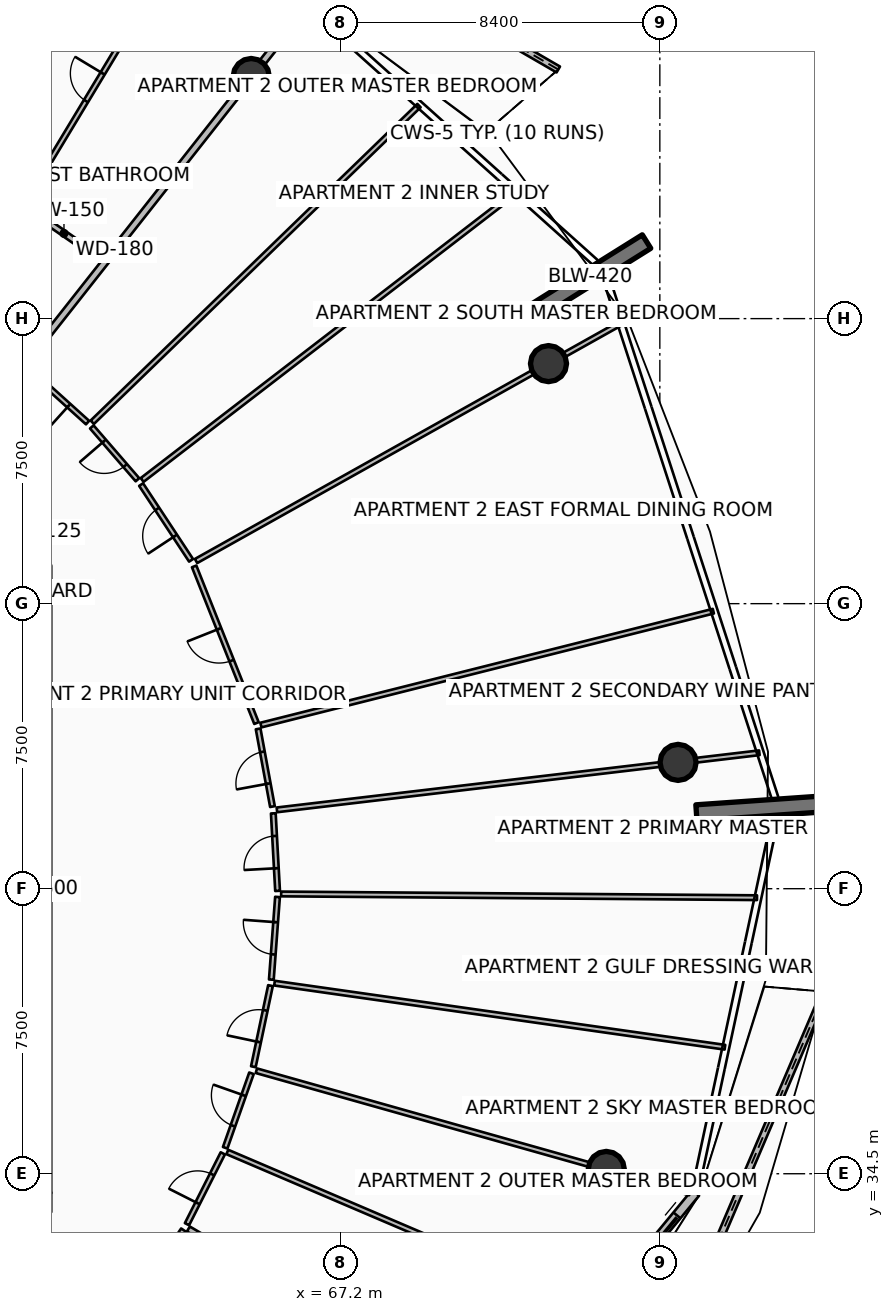
"""IFC4 building model, lengths in metres.
Left out: names, types, materials, properties, quantities, classifications, styles, units other than length and angle.
Written with IfcOpenShell. Run it as: python <this file> out.ifc"""

import sys

from ifc_helpers import new_model, si_unit, direction, frame, frame_2d, origin, origin_2d, place, context, subcontext, project, spatial, polyline, rectangle, circle, outline, extrude, element, fill, save


model = new_model("IFC4")
c1 = context("Model", 3, precision=1e-05, world=origin(), true_north=direction((0.0, 1.0)))
c2 = subcontext(c1, "Body", "Model", "MODEL_VIEW")
j1 = project(units=[si_unit("LENGTHUNIT", "METRE"), si_unit("PLANEANGLEUNIT", "RADIAN")], contexts=[c1])
p1 = place(None, origin())
s1 = spatial("IfcSite", under=j1, at=p1, CompositionType="ELEMENT")
p2 = place(p1, origin())
s2 = spatial("IfcBuilding", under=s1, at=p2, CompositionType="ELEMENT")
p3 = place(p2, frame((0.0, 0.0, 290.6)))
s3 = spatial("IfcBuildingStorey", under=s2, at=p3, CompositionType="ELEMENT", Elevation=290.6)
p4 = place(p3, frame((72.281, 57.173, 0.0), z_axis=(0.0, 0.0, 1.0), x_axis=(0.848033572426, 0.529942506352, 0.0)))
e1 = element("IfcWall", 1, at=p4, inside=s3, PredefinedType="SOLIDWALL", context=c2, shape_type="SweptSolid", body=[
    extrude(rectangle(XDim=3.5, YDim=0.42, at=frame_2d((1.75, 0.0))), origin(), (0.0, 0.0, 1.0), 3.85),
])
p5 = place(p3, frame((76.562, 43.997, 0.0), z_axis=(0.0, 0.0, 1.0), x_axis=(0.997563824095, 0.069759707979, 0.0)))
e2 = element("IfcWall", 2, at=p5, inside=s3, PredefinedType="SOLIDWALL", context=c2, shape_type="SweptSolid", body=[
    extrude(rectangle(XDim=3.5, YDim=0.42, at=frame_2d((1.75, 0.0))), origin(), (0.0, 0.0, 1.0), 3.85),
])
for number, where, z_axis, x_axis in (
    (3, (72.67, 55.816, 0.0), (0.0, 0.0, 1.0), (1.0, 0.0, 0.0)),
    (4, (64.847, 63.371, 0.0), (0.0, 0.0, 1.0), (1.0, 0.0, 0.0)),
    (5, (74.191, 34.613, 0.0), (0.0, 0.0, 1.0), (1.0, 0.0, 0.0)),
    (6, (76.08, 45.323, 0.0), (0.0, 0.0, 1.0), (1.0, 0.0, 0.0)),
):
    element("IfcColumn", number, at=place(p3, frame(where, z_axis=z_axis, x_axis=x_axis)), inside=s3, PredefinedType="COLUMN", context=c2, shape_type="SweptSolid", body=[
        extrude(circle(Radius=0.475, at=origin_2d()), origin(), (0.0, 0.0, 1.0), 3.59),
    ])
p6 = place(p3, frame((72.927, 63.555, 0.0), z_axis=(0.0, 0.0, 1.0), x_axis=(-0.865262565506, 0.501318953097, 0.0)))
e7 = element("IfcWall", 7, at=p6, inside=s3, PredefinedType="PARAPET", context=c2, shape_type="SweptSolid", body=[
    extrude(outline(polyline([(0.0, 0.0), (12.323, 0.0), (12.323, 1.832), (6.162, 1.853), (0.0, 1.756), (0.0, 0.0)])), frame((0.0, 0.09, 0.0), z_axis=(0.0, -1.0, 0.0), x_axis=(1.0, 0.0, 0.0)), (0.0, 0.0, 1.0), 0.18),
])
p7 = place(p3, frame((75.235, 28.258, 0.0), z_axis=(0.0, 0.0, 1.0), x_axis=(0.392715313702, 0.919660090677, 0.0)))
e8 = element("IfcWall", 8, at=p7, inside=s3, PredefinedType="PARAPET", context=c2, shape_type="SweptSolid", body=[
    extrude(outline(polyline([(0.0, 0.0), (11.995, 0.0), (11.995, 1.12), (5.998, 1.182), (0.0, 1.348), (0.0, 0.0)])), frame((0.0, 0.09, 0.0), z_axis=(0.0, -1.0, 0.0), x_axis=(1.0, 0.0, 0.0)), (0.0, 0.0, 1.0), 0.18),
])
p8 = place(p3, frame((69.258, 25.178, 0.0), z_axis=(0.0, 0.0, 1.0), x_axis=(0.636680093065, 0.771128043255, 0.0)))
e9 = element("IfcWall", 9, at=p8, inside=s3, PredefinedType="SOLIDWALL", context=c2, shape_type="SweptSolid", body=[
    extrude(rectangle(XDim=11.438, YDim=0.24, at=frame_2d((5.719, 0.0))), origin(), (0.0, 0.0, 1.0), 2.54),
])
p9 = place(p8, frame((9.218, 0.0, 0.0)))
e10 = element("IfcOpeningElement", 10, at=p9, cuts=e9, PredefinedType="OPENING", context=c2, shape_type="SweptSolid", body=[
    extrude(rectangle(XDim=1.45, YDim=2.15, at=frame_2d((0.725, 1.075))), frame((0.0, 0.13, 0.0), z_axis=(0.0, -1.0, 0.0), x_axis=(1.0, 0.0, 0.0)), (0.0, 0.0, 1.0), 0.26),
])
p10 = place(p8, frame((0.28, 0.0, 0.65)))
e11 = element("IfcOpeningElement", 11, at=p10, cuts=e9, PredefinedType="OPENING", context=c2, shape_type="SweptSolid", body=[
    extrude(rectangle(XDim=1.6, YDim=1.5, at=frame_2d((0.8, 0.75))), frame((0.0, 0.13, 0.0), z_axis=(0.0, -1.0, 0.0), x_axis=(1.0, 0.0, 0.0)), (0.0, 0.0, 1.0), 0.26),
])
p11 = place(p3, frame((56.188, 52.386, 0.0), z_axis=(0.0, 0.0, 1.0), x_axis=(0.619097230176, 0.785314344443, 0.0)))
e12 = element("IfcWall", 12, at=p11, inside=s3, PredefinedType="PARTITIONING", context=c2, shape_type="SweptSolid", body=[
    extrude(rectangle(XDim=16.37, YDim=0.18, at=frame_2d((8.185, 0.0))), origin(), (0.0, 0.0, 1.0), 2.957),
])
p12 = place(p3, frame((60.92, 58.55, 0.0), z_axis=(0.0, 0.0, 1.0), x_axis=(-0.822394599949, 0.568917500148, 0.0)))
e13 = element("IfcWall", 13, at=p12, inside=s3, PredefinedType="PARTITIONING", context=c2, shape_type="SweptSolid", body=[
    extrude(rectangle(XDim=2.431, YDim=0.15, at=frame_2d((1.216, 0.0))), origin(), (0.0, 0.0, 1.0), 2.957),
])
p13 = place(p3, frame((58.893, 60.061, 0.0), z_axis=(0.0, 0.0, 1.0), x_axis=(0.516439316059, 0.856323789713, 0.0)))
e14 = element("IfcWall", 14, at=p13, inside=s3, PredefinedType="PARTITIONING", context=c2, shape_type="SweptSolid", body=[
    extrude(rectangle(XDim=7.07, YDim=0.125, at=frame_2d((3.535, 0.0))), origin(), (0.0, 0.0, 1.0), 3.03),
])
p14 = place(p13, frame((3.11, 0.0, 0.0)))
e15 = element("IfcOpeningElement", 15, at=p14, cuts=e14, PredefinedType="OPENING", context=c2, shape_type="SweptSolid", body=[
    extrude(rectangle(XDim=0.85, YDim=2.06, at=frame_2d((0.425, 1.03))), frame((0.0, 0.073, 0.0), z_axis=(0.0, -1.0, 0.0), x_axis=(1.0, 0.0, 0.0)), (0.0, 0.0, 1.0), 0.145),
])
p15 = place(p3, frame((61.836, 31.22, 0.0), z_axis=(0.0, 0.0, 1.0), x_axis=(0.564720073442, 0.825282520505, 0.0)))
e16 = element("IfcWall", 16, at=p15, inside=s3, PredefinedType="PARTITIONING", context=c2, shape_type="SweptSolid", body=[
    extrude(rectangle(XDim=2.178, YDim=0.15, at=frame_2d((1.089, 0.0))), origin(), (0.0, 0.0, 1.0), 2.957),
])
p16 = place(p15, frame((0.664, 0.0, 0.0)))
e17 = element("IfcOpeningElement", 17, at=p16, cuts=e16, PredefinedType="OPENING", context=c2, shape_type="SweptSolid", body=[
    extrude(rectangle(XDim=0.85, YDim=2.06, at=frame_2d((0.425, 1.03))), frame((0.0, 0.085, 0.0), z_axis=(0.0, -1.0, 0.0), x_axis=(1.0, 0.0, 0.0)), (0.0, 0.0, 1.0), 0.17),
])
p17 = place(p3, frame((63.194, 33.046, 0.0), z_axis=(0.0, 0.0, 1.0), x_axis=(0.8615329034, -0.507701739566, 0.0)))
e18 = element("IfcWall", 18, at=p17, inside=s3, PredefinedType="PARTITIONING", context=c2, shape_type="SweptSolid", body=[
    extrude(rectangle(XDim=4.46, YDim=0.15, at=frame_2d((2.23, 0.0))), origin(), (0.0, 0.0, 1.0), 3.03),
])
p18 = place(p3, frame((64.219, 35.072, 0.0), z_axis=(0.0, 0.0, 1.0), x_axis=(0.91961011962, -0.392832315235, 0.0)))
e19 = element("IfcWall", 19, at=p18, inside=s3, PredefinedType="PARTITIONING", context=c2, shape_type="SweptSolid", body=[
    extrude(rectangle(XDim=10.493, YDim=0.125, at=frame_2d((5.247, 0.0))), origin(), (0.0, 0.0, 1.0), 3.03),
])
p19 = place(p3, frame((63.157, 33.172, 0.0), z_axis=(0.0, 0.0, 1.0), x_axis=(0.451230403471, 0.892407487073, 0.0)))
e20 = element("IfcWall", 20, at=p19, inside=s3, PredefinedType="PARTITIONING", context=c2, shape_type="SweptSolid", body=[
    extrude(rectangle(XDim=2.088, YDim=0.125, at=frame_2d((1.044, 0.0))), origin(), (0.0, 0.0, 1.0), 3.03),
])
p20 = place(p19, frame((0.619, 0.0, 0.0)))
e21 = element("IfcOpeningElement", 21, at=p20, cuts=e20, PredefinedType="OPENING", context=c2, shape_type="SweptSolid", body=[
    extrude(rectangle(XDim=0.85, YDim=2.06, at=frame_2d((0.425, 1.03))), frame((0.0, 0.073, 0.0), z_axis=(0.0, -1.0, 0.0), x_axis=(1.0, 0.0, 0.0)), (0.0, 0.0, 1.0), 0.145),
])
p21 = place(p3, frame((64.162, 35.183, 0.0), z_axis=(0.0, 0.0, 1.0), x_axis=(0.332881557629, 0.942968646664, 0.0)))
e22 = element("IfcWall", 22, at=p21, inside=s3, PredefinedType="PARTITIONING", context=c2, shape_type="SweptSolid", body=[
    extrude(rectangle(XDim=2.079, YDim=0.125, at=frame_2d((1.039, 0.0))), origin(), (0.0, 0.0, 1.0), 2.957),
])
p22 = place(p21, frame((0.614, 0.0, 0.0)))
e23 = element("IfcOpeningElement", 23, at=p22, cuts=e22, PredefinedType="OPENING", context=c2, shape_type="SweptSolid", body=[
    extrude(rectangle(XDim=0.85, YDim=2.06, at=frame_2d((0.425, 1.03))), frame((0.0, 0.073, 0.0), z_axis=(0.0, -1.0, 0.0), x_axis=(1.0, 0.0, 0.0)), (0.0, 0.0, 1.0), 0.145),
])
p23 = place(p3, frame((64.983, 37.21, 0.0), z_axis=(0.0, 0.0, 1.0), x_axis=(0.962453678557, -0.271445973691, 0.0)))
e24 = element("IfcWall", 24, at=p23, inside=s3, PredefinedType="PARTITIONING", context=c2, shape_type="SweptSolid", body=[
    extrude(rectangle(XDim=11.85, YDim=0.125, at=frame_2d((5.925, 0.0))), origin(), (0.0, 0.0, 1.0), 2.957),
])
p24 = place(p3, frame((65.46, 39.515, 0.0), z_axis=(0.0, 0.0, 1.0), x_axis=(0.990024400928, -0.140896009764, 0.0)))
e25 = element("IfcWall", 25, at=p24, inside=s3, PredefinedType="PARTITIONING", context=c2, shape_type="SweptSolid", body=[
    extrude(rectangle(XDim=11.972, YDim=0.125, at=frame_2d((5.986, 0.0))), origin(), (0.0, 0.0, 1.0), 3.03),
])
p25 = place(p3, frame((65.635, 41.862, 0.0), z_axis=(0.0, 0.0, 1.0), x_axis=(0.999969129377, -0.007857499155, 0.0)))
e26 = element("IfcWall", 26, at=p25, inside=s3, PredefinedType="PARTITIONING", context=c2, shape_type="SweptSolid", body=[
    extrude(rectangle(XDim=12.522, YDim=0.125, at=frame_2d((6.261, 0.0))), origin(), (0.0, 0.0, 1.0), 3.03),
])
p26 = place(p3, frame((64.904, 37.316, 0.0), z_axis=(0.0, 0.0, 1.0), x_axis=(0.206653610436, 0.978414168588, 0.0)))
e27 = element("IfcWall", 27, at=p26, inside=s3, PredefinedType="PARTITIONING", context=c2, shape_type="SweptSolid", body=[
    extrude(rectangle(XDim=2.181, YDim=0.125, at=frame_2d((1.09, 0.0))), origin(), (0.0, 0.0, 1.0), 2.957),
])
p27 = place(p26, frame((0.665, 0.0, 0.0)))
e28 = element("IfcOpeningElement", 28, at=p27, cuts=e27, PredefinedType="OPENING", context=c2, shape_type="SweptSolid", body=[
    extrude(rectangle(XDim=0.85, YDim=2.06, at=frame_2d((0.425, 1.03))), frame((0.0, 0.073, 0.0), z_axis=(0.0, -1.0, 0.0), x_axis=(1.0, 0.0, 0.0)), (0.0, 0.0, 1.0), 0.145),
])
p28 = place(p3, frame((65.377, 39.607, 0.0), z_axis=(0.0, 0.0, 1.0), x_axis=(0.074547851994, 0.997217437555, 0.0)))
e29 = element("IfcWall", 29, at=p28, inside=s3, PredefinedType="PARTITIONING", context=c2, shape_type="SweptSolid", body=[
    extrude(rectangle(XDim=2.181, YDim=0.125, at=frame_2d((1.091, 0.0))), origin(), (0.0, 0.0, 1.0), 3.03),
])
p29 = place(p28, frame((0.666, 0.0, 0.0)))
e30 = element("IfcOpeningElement", 30, at=p29, cuts=e29, PredefinedType="OPENING", context=c2, shape_type="SweptSolid", body=[
    extrude(rectangle(XDim=0.85, YDim=2.06, at=frame_2d((0.425, 1.03))), frame((0.0, 0.073, 0.0), z_axis=(0.0, -1.0, 0.0), x_axis=(1.0, 0.0, 0.0)), (0.0, 0.0, 1.0), 0.145),
])
p30 = place(p3, frame((65.541, 41.942, 0.0), z_axis=(0.0, 0.0, 1.0), x_axis=(-0.054960479128, 0.998488530597, 0.0)))
e31 = element("IfcWall", 31, at=p30, inside=s3, PredefinedType="PARTITIONING", context=c2, shape_type="SweptSolid", body=[
    extrude(rectangle(XDim=2.043, YDim=0.125, at=frame_2d((1.022, 0.0))), origin(), (0.0, 0.0, 1.0), 2.957),
])
p31 = place(p30, frame((0.597, 0.0, 0.0)))
e32 = element("IfcOpeningElement", 32, at=p31, cuts=e31, PredefinedType="OPENING", context=c2, shape_type="SweptSolid", body=[
    extrude(rectangle(XDim=0.85, YDim=2.06, at=frame_2d((0.425, 1.03))), frame((0.0, 0.073, 0.0), z_axis=(0.0, -1.0, 0.0), x_axis=(1.0, 0.0, 0.0)), (0.0, 0.0, 1.0), 0.145),
])
p32 = place(p3, frame((65.524, 44.074, 0.0), z_axis=(0.0, 0.0, 1.0), x_axis=(0.993069543008, 0.117528221075, 0.0)))
e33 = element("IfcWall", 33, at=p32, inside=s3, PredefinedType="PARTITIONING", context=c2, shape_type="SweptSolid", body=[
    extrude(rectangle(XDim=12.784, YDim=0.125, at=frame_2d((6.392, 0.0))), origin(), (0.0, 0.0, 1.0), 2.957),
])
p33 = place(p3, frame((65.102, 46.305, 0.0), z_axis=(0.0, 0.0, 1.0), x_axis=(0.969744651586, 0.244121508108, 0.0)))
e34 = element("IfcWall", 34, at=p33, inside=s3, PredefinedType="PARTITIONING", context=c2, shape_type="SweptSolid", body=[
    extrude(rectangle(XDim=12.277, YDim=0.125, at=frame_2d((6.138, 0.0))), origin(), (0.0, 0.0, 1.0), 3.03),
])
p34 = place(p3, frame((65.406, 44.161, 0.0), z_axis=(0.0, 0.0, 1.0), x_axis=(-0.181252122481, 0.983436661965, 0.0)))
e35 = element("IfcWall", 35, at=p34, inside=s3, PredefinedType="PARTITIONING", context=c2, shape_type="SweptSolid", body=[
    extrude(rectangle(XDim=2.078, YDim=0.125, at=frame_2d((1.039, 0.0))), origin(), (0.0, 0.0, 1.0), 2.957),
])
p35 = place(p34, frame((0.614, 0.0, 0.0)))
e36 = element("IfcOpeningElement", 36, at=p35, cuts=e35, PredefinedType="OPENING", context=c2, shape_type="SweptSolid", body=[
    extrude(rectangle(XDim=0.85, YDim=2.06, at=frame_2d((0.425, 1.03))), frame((0.0, 0.073, 0.0), z_axis=(0.0, -1.0, 0.0), x_axis=(1.0, 0.0, 0.0)), (0.0, 0.0, 1.0), 0.145),
])
p36 = place(p3, frame((64.986, 46.358, 0.0), z_axis=(0.0, 0.0, 1.0), x_axis=(-0.369596956752, 0.929192170414, 0.0)))
e37 = element("IfcWall", 37, at=p36, inside=s3, PredefinedType="PARTITIONING", context=c2, shape_type="SweptSolid", body=[
    extrude(rectangle(XDim=4.437, YDim=0.125, at=frame_2d((2.219, 0.0))), origin(), (0.0, 0.0, 1.0), 2.957),
])
p37 = place(p36, frame((1.768, 0.0, 0.0)))
e38 = element("IfcOpeningElement", 38, at=p37, cuts=e37, PredefinedType="OPENING", context=c2, shape_type="SweptSolid", body=[
    extrude(rectangle(XDim=0.9, YDim=2.08, at=frame_2d((0.45, 1.04))), frame((0.0, 0.073, 0.0), z_axis=(0.0, -1.0, 0.0), x_axis=(1.0, 0.0, 0.0)), (0.0, 0.0, 1.0), 0.145),
])
p38 = place(p3, frame((63.396, 50.622, 0.0), z_axis=(0.0, 0.0, 1.0), x_axis=(0.872499176967, 0.4886155812, 0.0)))
e39 = element("IfcWall", 39, at=p38, inside=s3, PredefinedType="PARTITIONING", context=c2, shape_type="SweptSolid", body=[
    extrude(rectangle(XDim=12.784, YDim=0.125, at=frame_2d((6.392, 0.0))), origin(), (0.0, 0.0, 1.0), 2.957),
])
p39 = place(p3, frame((61.978, 52.754, 0.0), z_axis=(0.0, 0.0, 1.0), x_axis=(0.792559605076, 0.609794450944, 0.0)))
e40 = element("IfcWall", 40, at=p39, inside=s3, PredefinedType="PARTITIONING", context=c2, shape_type="SweptSolid", body=[
    extrude(rectangle(XDim=12.406, YDim=0.125, at=frame_2d((6.203, 0.0))), origin(), (0.0, 0.0, 1.0), 3.03),
])
p40 = place(p3, frame((60.665, 54.273, 0.0), z_axis=(0.0, 0.0, 1.0), x_axis=(0.718133524399, 0.695905339205, 0.0)))
e41 = element("IfcWall", 41, at=p40, inside=s3, PredefinedType="PARTITIONING", context=c2, shape_type="SweptSolid", body=[
    extrude(rectangle(XDim=11.972, YDim=0.125, at=frame_2d((5.986, 0.0))), origin(), (0.0, 0.0, 1.0), 3.03),
])
p41 = place(p3, frame((63.265, 50.64, 0.0), z_axis=(0.0, 0.0, 1.0), x_axis=(-0.550634170063, 0.834746674602, 0.0)))
e42 = element("IfcWall", 42, at=p41, inside=s3, PredefinedType="PARTITIONING", context=c2, shape_type="SweptSolid", body=[
    extrude(rectangle(XDim=2.387, YDim=0.125, at=frame_2d((1.194, 0.0))), origin(), (0.0, 0.0, 1.0), 2.957),
])
p42 = place(p41, frame((0.769, 0.0, 0.0)))
e43 = element("IfcOpeningElement", 43, at=p42, cuts=e42, PredefinedType="OPENING", context=c2, shape_type="SweptSolid", body=[
    extrude(rectangle(XDim=0.85, YDim=2.06, at=frame_2d((0.425, 1.03))), frame((0.0, 0.073, 0.0), z_axis=(0.0, -1.0, 0.0), x_axis=(1.0, 0.0, 0.0)), (0.0, 0.0, 1.0), 0.145),
])
p43 = place(p3, frame((61.854, 52.76, 0.0), z_axis=(0.0, 0.0, 1.0), x_axis=(-0.653948493608, 0.756539072162, 0.0)))
e44 = element("IfcWall", 44, at=p43, inside=s3, PredefinedType="PARTITIONING", context=c2, shape_type="SweptSolid", body=[
    extrude(rectangle(XDim=1.837, YDim=0.125, at=frame_2d((0.918, 0.0))), origin(), (0.0, 0.0, 1.0), 3.03),
])
p44 = place(p43, frame((0.494, 0.0, 0.0)))
e45 = element("IfcOpeningElement", 45, at=p44, cuts=e44, PredefinedType="OPENING", context=c2, shape_type="SweptSolid", body=[
    extrude(rectangle(XDim=0.85, YDim=2.06, at=frame_2d((0.425, 1.03))), frame((0.0, 0.073, 0.0), z_axis=(0.0, -1.0, 0.0), x_axis=(1.0, 0.0, 0.0)), (0.0, 0.0, 1.0), 0.145),
])
p45 = place(p3, frame((60.541, 54.264, 0.0), z_axis=(0.0, 0.0, 1.0), x_axis=(-0.742235558018, 0.670139072443, 0.0)))
e46 = element("IfcWall", 46, at=p45, inside=s3, PredefinedType="PARTITIONING", context=c2, shape_type="SweptSolid", body=[
    extrude(rectangle(XDim=2.181, YDim=0.125, at=frame_2d((1.09, 0.0))), origin(), (0.0, 0.0, 1.0), 2.957),
])
p46 = place(p45, frame((0.666, 0.0, 0.0)))
e47 = element("IfcOpeningElement", 47, at=p46, cuts=e46, PredefinedType="OPENING", context=c2, shape_type="SweptSolid", body=[
    extrude(rectangle(XDim=0.85, YDim=2.06, at=frame_2d((0.425, 1.03))), frame((0.0, 0.073, 0.0), z_axis=(0.0, -1.0, 0.0), x_axis=(1.0, 0.0, 0.0)), (0.0, 0.0, 1.0), 0.145),
])
p47 = place(p9, origin())
e48 = element("IfcDoor", 48, at=p47, inside=s3, OperationType="DOUBLE_DOOR_SLIDING", PredefinedType="DOOR", context=c2, shape_type="SweptSolid", body=[
    extrude(rectangle(XDim=1.45, YDim=2.15, at=frame_2d((0.725, 1.075))), frame((0.0, 0.025, 0.0), z_axis=(0.0, -1.0, 0.0), x_axis=(1.0, 0.0, 0.0)), (0.0, 0.0, 1.0), 0.05),
])
fill(e10, e48)
p48 = place(p14, origin())
e49 = element("IfcDoor", 49, at=p48, inside=s3, OperationType="SINGLE_SWING_RIGHT", PredefinedType="DOOR", context=c2, shape_type="SweptSolid", body=[
    extrude(rectangle(XDim=0.85, YDim=2.06, at=frame_2d((0.425, 1.03))), frame((0.0, 0.025, 0.0), z_axis=(0.0, -1.0, 0.0), x_axis=(1.0, 0.0, 0.0)), (0.0, 0.0, 1.0), 0.05),
])
fill(e15, e49)
p49 = place(p20, origin())
e50 = element("IfcDoor", 50, at=p49, inside=s3, OperationType="SINGLE_SWING_LEFT", PredefinedType="DOOR", context=c2, shape_type="SweptSolid", body=[
    extrude(rectangle(XDim=0.85, YDim=2.06, at=frame_2d((0.425, 1.03))), frame((0.0, 0.025, 0.0), z_axis=(0.0, -1.0, 0.0), x_axis=(1.0, 0.0, 0.0)), (0.0, 0.0, 1.0), 0.05),
])
fill(e21, e50)
p50 = place(p22, origin())
e51 = element("IfcDoor", 51, at=p50, inside=s3, OperationType="SINGLE_SWING_RIGHT", PredefinedType="DOOR", context=c2, shape_type="SweptSolid", body=[
    extrude(rectangle(XDim=0.85, YDim=2.06, at=frame_2d((0.425, 1.03))), frame((0.0, 0.025, 0.0), z_axis=(0.0, -1.0, 0.0), x_axis=(1.0, 0.0, 0.0)), (0.0, 0.0, 1.0), 0.05),
])
fill(e23, e51)
p51 = place(p27, origin())
e52 = element("IfcDoor", 52, at=p51, inside=s3, OperationType="SINGLE_SWING_LEFT", PredefinedType="DOOR", context=c2, shape_type="SweptSolid", body=[
    extrude(rectangle(XDim=0.85, YDim=2.06, at=frame_2d((0.425, 1.03))), frame((0.0, 0.025, 0.0), z_axis=(0.0, -1.0, 0.0), x_axis=(1.0, 0.0, 0.0)), (0.0, 0.0, 1.0), 0.05),
])
fill(e28, e52)
p52 = place(p29, origin())
e53 = element("IfcDoor", 53, at=p52, inside=s3, OperationType="SINGLE_SWING_RIGHT", PredefinedType="DOOR", context=c2, shape_type="SweptSolid", body=[
    extrude(rectangle(XDim=0.85, YDim=2.06, at=frame_2d((0.425, 1.03))), frame((0.0, 0.025, 0.0), z_axis=(0.0, -1.0, 0.0), x_axis=(1.0, 0.0, 0.0)), (0.0, 0.0, 1.0), 0.05),
])
fill(e30, e53)
p53 = place(p31, origin())
e54 = element("IfcDoor", 54, at=p53, inside=s3, OperationType="SINGLE_SWING_LEFT", PredefinedType="DOOR", context=c2, shape_type="SweptSolid", body=[
    extrude(rectangle(XDim=0.85, YDim=2.06, at=frame_2d((0.425, 1.03))), frame((0.0, 0.025, 0.0), z_axis=(0.0, -1.0, 0.0), x_axis=(1.0, 0.0, 0.0)), (0.0, 0.0, 1.0), 0.05),
])
fill(e32, e54)
p54 = place(p35, origin())
e55 = element("IfcDoor", 55, at=p54, inside=s3, OperationType="SINGLE_SWING_LEFT", PredefinedType="DOOR", context=c2, shape_type="SweptSolid", body=[
    extrude(rectangle(XDim=0.85, YDim=2.06, at=frame_2d((0.425, 1.03))), frame((0.0, 0.025, 0.0), z_axis=(0.0, -1.0, 0.0), x_axis=(1.0, 0.0, 0.0)), (0.0, 0.0, 1.0), 0.05),
])
fill(e36, e55)
p55 = place(p37, origin())
e56 = element("IfcDoor", 56, at=p55, inside=s3, OperationType="SINGLE_SWING_RIGHT", PredefinedType="DOOR", context=c2, shape_type="SweptSolid", body=[
    extrude(rectangle(XDim=0.9, YDim=2.08, at=frame_2d((0.45, 1.04))), frame((0.0, 0.025, 0.0), z_axis=(0.0, -1.0, 0.0), x_axis=(1.0, 0.0, 0.0)), (0.0, 0.0, 1.0), 0.05),
])
fill(e38, e56)
p56 = place(p42, origin())
e57 = element("IfcDoor", 57, at=p56, inside=s3, OperationType="SINGLE_SWING_LEFT", PredefinedType="DOOR", context=c2, shape_type="SweptSolid", body=[
    extrude(rectangle(XDim=0.85, YDim=2.06, at=frame_2d((0.425, 1.03))), frame((0.0, 0.025, 0.0), z_axis=(0.0, -1.0, 0.0), x_axis=(1.0, 0.0, 0.0)), (0.0, 0.0, 1.0), 0.05),
])
fill(e43, e57)
p57 = place(p44, origin())
e58 = element("IfcDoor", 58, at=p57, inside=s3, OperationType="SINGLE_SWING_RIGHT", PredefinedType="DOOR", context=c2, shape_type="SweptSolid", body=[
    extrude(rectangle(XDim=0.85, YDim=2.06, at=frame_2d((0.425, 1.03))), frame((0.0, 0.025, 0.0), z_axis=(0.0, -1.0, 0.0), x_axis=(1.0, 0.0, 0.0)), (0.0, 0.0, 1.0), 0.05),
])
fill(e45, e58)
p58 = place(p46, origin())
e59 = element("IfcDoor", 59, at=p58, inside=s3, OperationType="SINGLE_SWING_LEFT", PredefinedType="DOOR", context=c2, shape_type="SweptSolid", body=[
    extrude(rectangle(XDim=0.85, YDim=2.06, at=frame_2d((0.425, 1.03))), frame((0.0, 0.025, 0.0), z_axis=(0.0, -1.0, 0.0), x_axis=(1.0, 0.0, 0.0)), (0.0, 0.0, 1.0), 0.05),
])
fill(e47, e59)
save(model, sys.argv[1])
